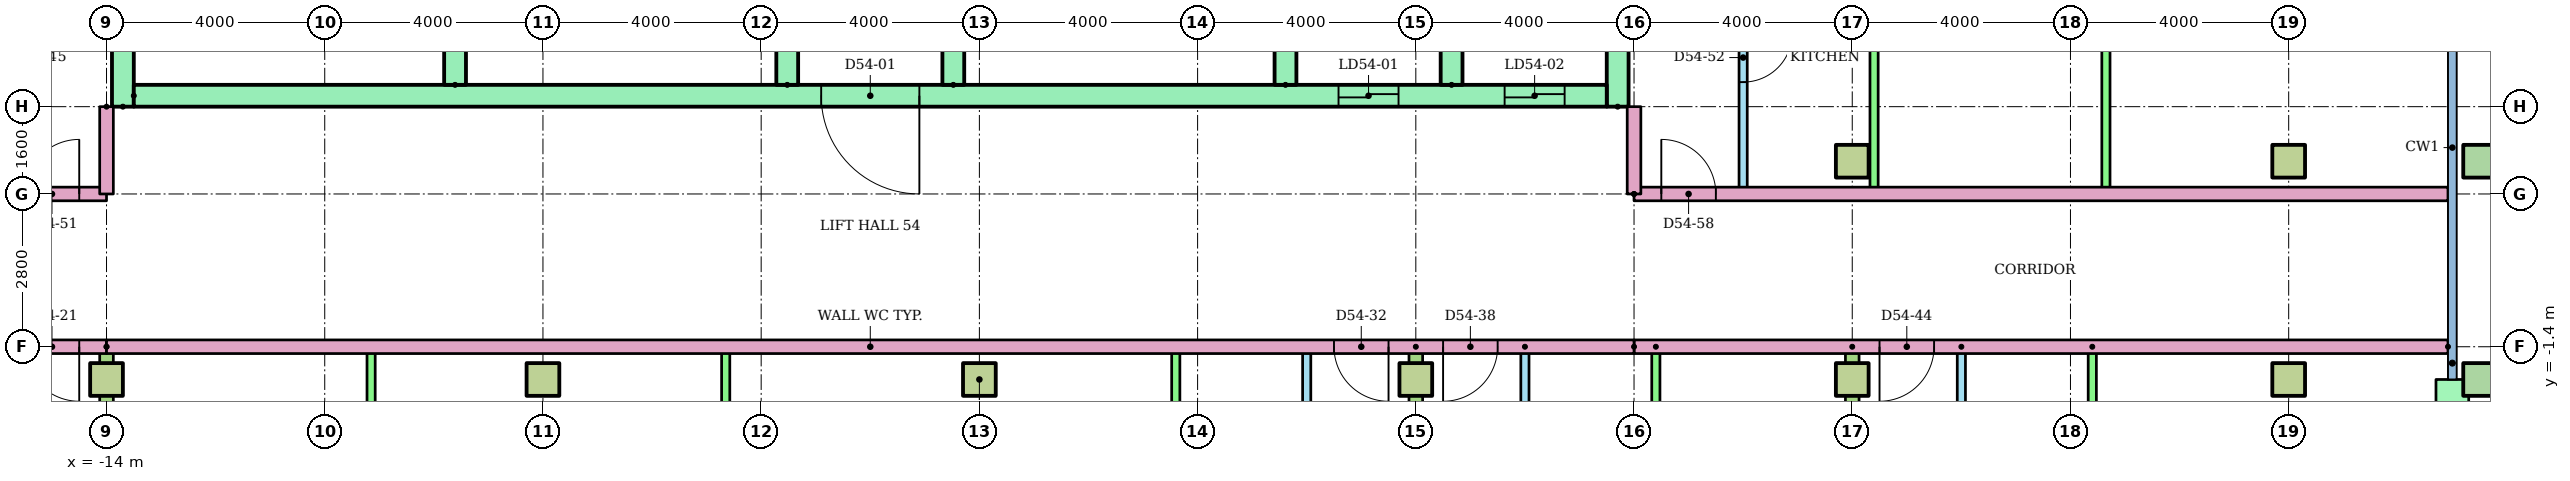
"""IFC4 building model, lengths in metres.
Left out: names, types, materials, properties, quantities, classifications, styles, units other than length and angle.
Written with IfcOpenShell. Run it as: python <this file> out.ifc"""

import sys

from ifc_helpers import new_model, si_unit, direction, frame, frame_2d, origin, origin_2d, place, context, subcontext, project, spatial, rectangle, hollow_rectangle, extrude, element, fill, save


model = new_model("IFC4")
c1 = context("Model", 3, precision=1e-05, world=origin(), true_north=direction((0.0, 1.0)))
c2 = subcontext(c1, "Body", "Model", "MODEL_VIEW")
j1 = project(units=[si_unit("LENGTHUNIT", "METRE"), si_unit("PLANEANGLEUNIT", "RADIAN")], contexts=[c1])
p1 = place(None, origin())
s1 = spatial("IfcSite", under=j1, at=p1, CompositionType="ELEMENT")
p2 = place(p1, origin())
s2 = spatial("IfcBuilding", under=s1, at=p2, CompositionType="ELEMENT")
p3 = place(p2, frame((0.0, 0.0, 210.8)))
s3 = spatial("IfcBuildingStorey", under=s2, at=p3, CompositionType="ELEMENT", Elevation=210.8)
for number, where in (
    (1, (-14.0, -2.0, 0.0)),
    (2, (-6.0, -2.0, 0.0)),
    (3, (2.0, -2.0, 0.0)),
    (4, (10.0, -2.0, 0.0)),
    (5, (18.0, -2.0, 0.0)),
    (6, (26.0, -2.0, 0.0)),
):
    element("IfcColumn", number, at=place(p3, frame(where)), inside=s3, PredefinedType="COLUMN", context=c2, shape_type="SweptSolid", body=[
        extrude(rectangle(XDim=0.6, YDim=0.6, at=origin_2d()), origin(), (0.0, 0.0, 1.0), 3.2),
    ])
p4 = place(p3, frame((29.5, -2.0, 0.0)))
e7 = element("IfcColumn", 7, at=p4, inside=s3, PredefinedType="COLUMN", context=c2, shape_type="SweptSolid", body=[
    extrude(hollow_rectangle(XDim=0.6, YDim=0.6, WallThickness=0.03, at=origin_2d()), origin(), (0.0, 0.0, 1.0), 3.2),
])
for number, where in (
    (8, (18.0, 2.0, 0.0)),
    (9, (26.0, 2.0, 0.0)),
):
    element("IfcColumn", number, at=place(p3, frame(where)), inside=s3, PredefinedType="COLUMN", context=c2, shape_type="SweptSolid", body=[
        extrude(rectangle(XDim=0.6, YDim=0.6, at=origin_2d()), origin(), (0.0, 0.0, 1.0), 3.2),
    ])
p5 = place(p3, frame((29.5, 2.0, 0.0)))
e10 = element("IfcColumn", 10, at=p5, inside=s3, PredefinedType="COLUMN", context=c2, shape_type="SweptSolid", body=[
    extrude(hollow_rectangle(XDim=0.6, YDim=0.6, WallThickness=0.03, at=origin_2d()), origin(), (0.0, 0.0, 1.0), 3.2),
])
p6 = place(p3, frame((29.0, -5.7, 0.0), z_axis=(0.0, 0.0, 1.0), x_axis=(0.0, 1.0, 0.0)))
e11 = element("IfcWall", 11, at=p6, inside=s3, PredefinedType="STANDARD", context=c2, shape_type="SweptSolid", body=[
    extrude(rectangle(XDim=3.7, YDim=0.6, at=frame_2d((1.85, 0.0))), origin(), (0.0, 0.0, 1.0), 2.92),
])
p7 = place(p6, frame((1.25, 0.0, 0.0)))
e12 = element("IfcOpeningElement", 12, at=p7, cuts=e11, PredefinedType="OPENING", context=c2, shape_type="SweptSolid", body=[
    extrude(rectangle(XDim=1.2, YDim=2.1, at=frame_2d((0.6, 1.05))), frame((0.0, 0.31, 0.0), z_axis=(0.0, -1.0, 0.0), x_axis=(1.0, 0.0, 0.0)), (0.0, 0.0, 1.0), 0.62),
])
for number, where, z_axis, x_axis in (
    (13, (-13.7, 3.0, 0.0), (0.0, 0.0, 1.0), (0.0, 1.0, 0.0)),
    (14, (13.7, 3.0, 0.0), (0.0, 0.0, 1.0), (0.0, 1.0, 0.0)),
):
    element("IfcWall", number, at=place(p3, frame(where, z_axis=z_axis, x_axis=x_axis)), inside=s3, PredefinedType="SHEAR", context=c2, shape_type="SweptSolid", body=[
        extrude(rectangle(XDim=17.0, YDim=0.4, at=frame_2d((8.5, 0.0))), origin(), (0.0, 0.0, 1.0), 2.92),
    ])
p8 = place(p3, frame((-13.5, 3.2, 0.0)))
e15 = element("IfcWall", 15, at=p8, inside=s3, PredefinedType="SHEAR", context=c2, shape_type="SweptSolid", body=[
    extrude(rectangle(XDim=27.0, YDim=0.4, at=frame_2d((13.5, 0.0))), origin(), (0.0, 0.0, 1.0), 2.92),
])
p9 = place(p8, frame((22.083, 0.0, 0.0)))
e16 = element("IfcOpeningElement", 16, at=p9, cuts=e15, PredefinedType="OPENING", context=c2, shape_type="SweptSolid", body=[
    extrude(rectangle(XDim=1.1, YDim=2.1, at=frame_2d((0.55, 1.05))), frame((0.0, 0.21, 0.0), z_axis=(0.0, -1.0, 0.0), x_axis=(1.0, 0.0, 0.0)), (0.0, 0.0, 1.0), 0.42),
])
p10 = place(p8, frame((25.128, 0.0, 0.0)))
e17 = element("IfcOpeningElement", 17, at=p10, cuts=e15, PredefinedType="OPENING", context=c2, shape_type="SweptSolid", body=[
    extrude(rectangle(XDim=1.1, YDim=2.1, at=frame_2d((0.55, 1.05))), frame((0.0, 0.21, 0.0), z_axis=(0.0, -1.0, 0.0), x_axis=(1.0, 0.0, 0.0)), (0.0, 0.0, 1.0), 0.42),
])
p11 = place(p8, frame((12.6, 0.0, 0.0)))
e18 = element("IfcOpeningElement", 18, at=p11, cuts=e15, PredefinedType="OPENING", context=c2, shape_type="SweptSolid", body=[
    extrude(rectangle(XDim=1.8, YDim=2.1, at=frame_2d((0.9, 1.05))), frame((0.0, 0.21, 0.0), z_axis=(0.0, -1.0, 0.0), x_axis=(1.0, 0.0, 0.0)), (0.0, 0.0, 1.0), 0.42),
])
for number, where, z_axis, x_axis in (
    (19, (-7.611, 3.4, 0.0), (0.0, 0.0, 1.0), (0.0, 1.0, 0.0)),
    (20, (-1.522, 3.4, 0.0), (0.0, 0.0, 1.0), (0.0, 1.0, 0.0)),
    (21, (1.522, 3.4, 0.0), (0.0, 0.0, 1.0), (0.0, 1.0, 0.0)),
    (22, (7.611, 3.4, 0.0), (0.0, 0.0, 1.0), (0.0, 1.0, 0.0)),
    (23, (10.656, 3.4, 0.0), (0.0, 0.0, 1.0), (0.0, 1.0, 0.0)),
):
    element("IfcWall", number, at=place(p3, frame(where, z_axis=z_axis, x_axis=x_axis)), inside=s3, PredefinedType="SHEAR", context=c2, shape_type="SweptSolid", body=[
        extrude(rectangle(XDim=3.0, YDim=0.4, at=frame_2d((1.5, 0.0))), origin(), (0.0, 0.0, 1.0), 2.92),
    ])
p12 = place(p3, frame((8.0, -8.2, 0.0), z_axis=(0.0, 0.0, 1.0), x_axis=(0.0, 1.0, 0.0)))
e24 = element("IfcWall", 24, at=p12, inside=s3, PredefinedType="PARTITIONING", context=c2, shape_type="SweptSolid", body=[
    extrude(rectangle(XDim=6.8, YDim=0.15, at=frame_2d((3.4, 0.0))), origin(), (0.0, 0.0, 1.0), 2.4),
])
p13 = place(p12, frame((4.475, 0.0, 0.0)))
e25 = element("IfcOpeningElement", 25, at=p13, cuts=e24, PredefinedType="OPENING", context=c2, shape_type="SweptSolid", body=[
    extrude(rectangle(XDim=0.9, YDim=2.1, at=frame_2d((0.45, 1.05))), frame((0.0, 0.085, 0.0), z_axis=(0.0, -1.0, 0.0), x_axis=(1.0, 0.0, 0.0)), (0.0, 0.0, 1.0), 0.17),
])
p14 = place(p12, frame((1.125, 0.0, 0.0)))
e26 = element("IfcOpeningElement", 26, at=p14, cuts=e24, PredefinedType="OPENING", context=c2, shape_type="SweptSolid", body=[
    extrude(rectangle(XDim=0.8, YDim=2.1, at=frame_2d((0.4, 1.05))), frame((0.0, 0.085, 0.0), z_axis=(0.0, -1.0, 0.0), x_axis=(1.0, 0.0, 0.0)), (0.0, 0.0, 1.0), 0.17),
])
for number, where, z_axis, x_axis in (
    (27, (5.6, -8.2, 0.0), (0.0, 0.0, 1.0), (0.0, 1.0, 0.0)),
    (28, (-2.65, -8.2, 0.0), (0.0, 0.0, 1.0), (0.0, 1.0, 0.0)),
    (29, (-9.15, -8.2, 0.0), (0.0, 0.0, 1.0), (0.0, 1.0, 0.0)),
):
    element("IfcWall", number, at=place(p3, frame(where, z_axis=z_axis, x_axis=x_axis)), inside=s3, PredefinedType="PARTITIONING", context=c2, shape_type="SweptSolid", body=[
        extrude(rectangle(XDim=6.8, YDim=0.15, at=frame_2d((3.4, 0.0))), origin(), (0.0, 0.0, 1.0), 2.4),
    ])
p15 = place(p3, frame((-14.0, -1.4, 0.0), z_axis=(0.0, 0.0, 1.0), x_axis=(0.0, -1.0, 0.0)))
e30 = element("IfcWall", 30, at=p15, inside=s3, PredefinedType="PARTITIONING", context=c2, shape_type="SweptSolid", body=[
    extrude(rectangle(XDim=15.11, YDim=0.25, at=frame_2d((7.555, 0.0))), origin(), (0.0, 0.0, 1.0), 2.4),
])
p16 = place(p3, frame((12.0, -1.4, 0.0), z_axis=(0.0, 0.0, 1.0), x_axis=(0.0, -1.0, 0.0)))
e31 = element("IfcWall", 31, at=p16, inside=s3, PredefinedType="PARTITIONING", context=c2, shape_type="SweptSolid", body=[
    extrude(rectangle(XDim=6.8, YDim=0.15, at=frame_2d((3.4, 0.0))), origin(), (0.0, 0.0, 1.0), 2.4),
])
p17 = place(p16, frame((1.425, 0.0, 0.0)))
e32 = element("IfcOpeningElement", 32, at=p17, cuts=e31, PredefinedType="OPENING", context=c2, shape_type="SweptSolid", body=[
    extrude(rectangle(XDim=0.9, YDim=2.1, at=frame_2d((0.45, 1.05))), frame((0.0, 0.085, 0.0), z_axis=(0.0, -1.0, 0.0), x_axis=(1.0, 0.0, 0.0)), (0.0, 0.0, 1.0), 0.17),
])
p18 = place(p16, frame((4.875, 0.0, 0.0)))
e33 = element("IfcOpeningElement", 33, at=p18, cuts=e31, PredefinedType="OPENING", context=c2, shape_type="SweptSolid", body=[
    extrude(rectangle(XDim=0.8, YDim=2.1, at=frame_2d((0.4, 1.05))), frame((0.0, 0.085, 0.0), z_axis=(0.0, -1.0, 0.0), x_axis=(1.0, 0.0, 0.0)), (0.0, 0.0, 1.0), 0.17),
])
p19 = place(p3, frame((14.4, -1.4, 0.0), z_axis=(0.0, 0.0, 1.0), x_axis=(0.0, -1.0, 0.0)))
e34 = element("IfcWall", 34, at=p19, inside=s3, PredefinedType="PARTITIONING", context=c2, shape_type="SweptSolid", body=[
    extrude(rectangle(XDim=6.8, YDim=0.15, at=frame_2d((3.4, 0.0))), origin(), (0.0, 0.0, 1.0), 2.4),
])
p20 = place(p3, frame((10.0, -1.4, 0.0), z_axis=(0.0, 0.0, 1.0), x_axis=(0.0, -1.0, 0.0)))
e35 = element("IfcWall", 35, at=p20, inside=s3, PredefinedType="PARTITIONING", context=c2, shape_type="SweptSolid", body=[
    extrude(rectangle(XDim=15.11, YDim=0.25, at=frame_2d((7.555, 0.0))), origin(), (0.0, 0.0, 1.0), 2.4),
])
p21 = place(p3, frame((20.0, -1.4, 0.0), z_axis=(0.0, 0.0, 1.0), x_axis=(0.0, -1.0, 0.0)))
e36 = element("IfcWall", 36, at=p21, inside=s3, PredefinedType="PARTITIONING", context=c2, shape_type="SweptSolid", body=[
    extrude(rectangle(XDim=6.8, YDim=0.15, at=frame_2d((3.4, 0.0))), origin(), (0.0, 0.0, 1.0), 2.4),
])
p22 = place(p21, frame((1.425, 0.0, 0.0)))
e37 = element("IfcOpeningElement", 37, at=p22, cuts=e36, PredefinedType="OPENING", context=c2, shape_type="SweptSolid", body=[
    extrude(rectangle(XDim=0.9, YDim=2.1, at=frame_2d((0.45, 1.05))), frame((0.0, 0.085, 0.0), z_axis=(0.0, -1.0, 0.0), x_axis=(1.0, 0.0, 0.0)), (0.0, 0.0, 1.0), 0.17),
])
p23 = place(p21, frame((4.875, 0.0, 0.0)))
e38 = element("IfcOpeningElement", 38, at=p23, cuts=e36, PredefinedType="OPENING", context=c2, shape_type="SweptSolid", body=[
    extrude(rectangle(XDim=0.8, YDim=2.1, at=frame_2d((0.4, 1.05))), frame((0.0, 0.085, 0.0), z_axis=(0.0, -1.0, 0.0), x_axis=(1.0, 0.0, 0.0)), (0.0, 0.0, 1.0), 0.17),
])
p24 = place(p3, frame((22.4, -1.4, 0.0), z_axis=(0.0, 0.0, 1.0), x_axis=(0.0, -1.0, 0.0)))
e39 = element("IfcWall", 39, at=p24, inside=s3, PredefinedType="PARTITIONING", context=c2, shape_type="SweptSolid", body=[
    extrude(rectangle(XDim=6.8, YDim=0.15, at=frame_2d((3.4, 0.0))), origin(), (0.0, 0.0, 1.0), 2.4),
])
p25 = place(p3, frame((18.0, -1.4, 0.0), z_axis=(0.0, 0.0, 1.0), x_axis=(0.0, -1.0, 0.0)))
e40 = element("IfcWall", 40, at=p25, inside=s3, PredefinedType="PARTITIONING", context=c2, shape_type="SweptSolid", body=[
    extrude(rectangle(XDim=15.11, YDim=0.25, at=frame_2d((7.555, 0.0))), origin(), (0.0, 0.0, 1.0), 2.4),
])
p26 = place(p3, frame((-14.0, -1.4, 0.0), z_axis=(0.0, 0.0, 1.0), x_axis=(-1.0, 0.0, 0.0)))
e41 = element("IfcWall", 41, at=p26, inside=s3, PredefinedType="PARTITIONING", context=c2, shape_type="SweptSolid", body=[
    extrude(rectangle(XDim=14.92, YDim=0.25, at=frame_2d((7.46, 0.0))), origin(), (0.0, 0.0, 1.0), 2.4),
])
p27 = place(p26, frame((0.5, 0.0, 0.0)))
e42 = element("IfcOpeningElement", 42, at=p27, cuts=e41, PredefinedType="OPENING", context=c2, shape_type="SweptSolid", body=[
    extrude(rectangle(XDim=1.0, YDim=2.1, at=frame_2d((0.5, 1.05))), frame((0.0, 0.135, 0.0), z_axis=(0.0, -1.0, 0.0), x_axis=(1.0, 0.0, 0.0)), (0.0, 0.0, 1.0), 0.27),
])
p28 = place(p3, frame((28.92, -1.4, 0.0), z_axis=(0.0, 0.0, 1.0), x_axis=(-1.0, 0.0, 0.0)))
e43 = element("IfcWall", 43, at=p28, inside=s3, PredefinedType="PARTITIONING", context=c2, shape_type="SweptSolid", body=[
    extrude(rectangle(XDim=14.92, YDim=0.25, at=frame_2d((7.46, 0.0))), origin(), (0.0, 0.0, 1.0), 2.4),
])
p29 = place(p28, frame((9.42, 0.0, 0.0)))
e44 = element("IfcOpeningElement", 44, at=p29, cuts=e43, PredefinedType="OPENING", context=c2, shape_type="SweptSolid", body=[
    extrude(rectangle(XDim=1.0, YDim=2.1, at=frame_2d((0.5, 1.05))), frame((0.0, 0.135, 0.0), z_axis=(0.0, -1.0, 0.0), x_axis=(1.0, 0.0, 0.0)), (0.0, 0.0, 1.0), 0.27),
])
p30 = place(p3, frame((-28.92, 1.4, 0.0)))
e45 = element("IfcWall", 45, at=p30, inside=s3, PredefinedType="PARTITIONING", context=c2, shape_type="SweptSolid", body=[
    extrude(rectangle(XDim=14.92, YDim=0.25, at=frame_2d((7.46, 0.0))), origin(), (0.0, 0.0, 1.0), 2.4),
])
p31 = place(p30, frame((13.42, 0.0, 0.0)))
e46 = element("IfcOpeningElement", 46, at=p31, cuts=e45, PredefinedType="OPENING", context=c2, shape_type="SweptSolid", body=[
    extrude(rectangle(XDim=1.0, YDim=2.1, at=frame_2d((0.5, 1.05))), frame((0.0, 0.135, 0.0), z_axis=(0.0, -1.0, 0.0), x_axis=(1.0, 0.0, 0.0)), (0.0, 0.0, 1.0), 0.27),
])
p32 = place(p3, frame((16.0, 10.6, 0.0), z_axis=(0.0, 0.0, 1.0), x_axis=(0.0, -1.0, 0.0)))
e47 = element("IfcWall", 47, at=p32, inside=s3, PredefinedType="PARTITIONING", context=c2, shape_type="SweptSolid", body=[
    extrude(rectangle(XDim=9.2, YDim=0.15, at=frame_2d((4.6, 0.0))), origin(), (0.0, 0.0, 1.0), 2.4),
])
p33 = place(p32, frame((6.25, 0.0, 0.0)))
e48 = element("IfcOpeningElement", 48, at=p33, cuts=e47, PredefinedType="OPENING", context=c2, shape_type="SweptSolid", body=[
    extrude(rectangle(XDim=0.9, YDim=2.1, at=frame_2d((0.45, 1.05))), frame((0.0, 0.085, 0.0), z_axis=(0.0, -1.0, 0.0), x_axis=(1.0, 0.0, 0.0)), (0.0, 0.0, 1.0), 0.17),
])
p34 = place(p32, frame((1.7, 0.0, 0.0)))
e49 = element("IfcOpeningElement", 49, at=p34, cuts=e47, PredefinedType="OPENING", context=c2, shape_type="SweptSolid", body=[
    extrude(rectangle(XDim=0.8, YDim=2.1, at=frame_2d((0.4, 1.05))), frame((0.0, 0.085, 0.0), z_axis=(0.0, -1.0, 0.0), x_axis=(1.0, 0.0, 0.0)), (0.0, 0.0, 1.0), 0.17),
])
for number, where, z_axis, x_axis in (
    (50, (18.4, 10.6, 0.0), (0.0, 0.0, 1.0), (0.0, -1.0, 0.0)),
    (51, (22.65, 10.6, 0.0), (0.0, 0.0, 1.0), (0.0, -1.0, 0.0)),
):
    element("IfcWall", number, at=place(p3, frame(where, z_axis=z_axis, x_axis=x_axis)), inside=s3, PredefinedType="PARTITIONING", context=c2, shape_type="SweptSolid", body=[
        extrude(rectangle(XDim=9.2, YDim=0.15, at=frame_2d((4.6, 0.0))), origin(), (0.0, 0.0, 1.0), 2.4),
    ])
p35 = place(p3, frame((14.0, 1.4, 0.0)))
e52 = element("IfcWall", 52, at=p35, inside=s3, PredefinedType="PARTITIONING", context=c2, shape_type="SweptSolid", body=[
    extrude(rectangle(XDim=14.92, YDim=0.25, at=frame_2d((7.46, 0.0))), origin(), (0.0, 0.0, 1.0), 2.4),
])
p36 = place(p35, frame((0.5, 0.0, 0.0)))
e53 = element("IfcOpeningElement", 53, at=p36, cuts=e52, PredefinedType="OPENING", context=c2, shape_type="SweptSolid", body=[
    extrude(rectangle(XDim=1.0, YDim=2.1, at=frame_2d((0.5, 1.05))), frame((0.0, 0.135, 0.0), z_axis=(0.0, -1.0, 0.0), x_axis=(1.0, 0.0, 0.0)), (0.0, 0.0, 1.0), 0.27),
])
p37 = place(p3, frame((14.0, -1.4, 0.0), z_axis=(0.0, 0.0, 1.0), x_axis=(-1.0, 0.0, 0.0)))
e54 = element("IfcWall", 54, at=p37, inside=s3, PredefinedType="PARTITIONING", context=c2, shape_type="SweptSolid", body=[
    extrude(rectangle(XDim=28.0, YDim=0.25, at=frame_2d((14.0, 0.0))), origin(), (0.0, 0.0, 1.0), 2.4),
])
p38 = place(p37, frame((4.5, 0.0, 0.0)))
e55 = element("IfcOpeningElement", 55, at=p38, cuts=e54, PredefinedType="OPENING", context=c2, shape_type="SweptSolid", body=[
    extrude(rectangle(XDim=1.0, YDim=2.1, at=frame_2d((0.5, 1.05))), frame((0.0, 0.135, 0.0), z_axis=(0.0, -1.0, 0.0), x_axis=(1.0, 0.0, 0.0)), (0.0, 0.0, 1.0), 0.27),
])
p39 = place(p37, frame((2.5, 0.0, 0.0)))
e56 = element("IfcOpeningElement", 56, at=p39, cuts=e54, PredefinedType="OPENING", context=c2, shape_type="SweptSolid", body=[
    extrude(rectangle(XDim=1.0, YDim=2.1, at=frame_2d((0.5, 1.05))), frame((0.0, 0.135, 0.0), z_axis=(0.0, -1.0, 0.0), x_axis=(1.0, 0.0, 0.0)), (0.0, 0.0, 1.0), 0.27),
])
for number, where, z_axis, x_axis in (
    (57, (-14.0, 3.0, 0.0), (0.0, 0.0, 1.0), (0.0, -1.0, 0.0)),
    (58, (14.0, 1.4, 0.0), (0.0, 0.0, 1.0), (0.0, 1.0, 0.0)),
):
    element("IfcWall", number, at=place(p3, frame(where, z_axis=z_axis, x_axis=x_axis)), inside=s3, PredefinedType="PARTITIONING", context=c2, shape_type="SweptSolid", body=[
        extrude(rectangle(XDim=1.6, YDim=0.25, at=frame_2d((0.8, 0.0))), origin(), (0.0, 0.0, 1.0), 2.4),
    ])
p40 = place(p9, origin())
e59 = element("IfcDoor", 59, at=p40, inside=s3, OperationType="SLIDING_TO_LEFT", PredefinedType="DOOR", context=c2, shape_type="SweptSolid", body=[
    extrude(rectangle(XDim=1.1, YDim=2.1, at=frame_2d((0.55, 1.05))), frame((0.0, 0.025, 0.0), z_axis=(0.0, -1.0, 0.0), x_axis=(1.0, 0.0, 0.0)), (0.0, 0.0, 1.0), 0.05),
])
fill(e16, e59)
p41 = place(p10, origin())
e60 = element("IfcDoor", 60, at=p41, inside=s3, OperationType="SLIDING_TO_LEFT", PredefinedType="DOOR", context=c2, shape_type="SweptSolid", body=[
    extrude(rectangle(XDim=1.1, YDim=2.1, at=frame_2d((0.55, 1.05))), frame((0.0, 0.025, 0.0), z_axis=(0.0, -1.0, 0.0), x_axis=(1.0, 0.0, 0.0)), (0.0, 0.0, 1.0), 0.05),
])
fill(e17, e60)
p42 = place(p11, frame((1.8, 0.0, 0.0), z_axis=(0.0, 0.0, 1.0), x_axis=(-1.0, 0.0, 0.0)))
e61 = element("IfcDoor", 61, at=p42, inside=s3, OperationType="DOUBLE_DOOR_SINGLE_SWING", PredefinedType="DOOR", context=c2, shape_type="SweptSolid", body=[
    extrude(rectangle(XDim=1.8, YDim=2.1, at=frame_2d((0.9, 1.05))), frame((0.0, 0.025, 0.0), z_axis=(0.0, -1.0, 0.0), x_axis=(1.0, 0.0, 0.0)), (0.0, 0.0, 1.0), 0.05),
])
fill(e18, e61)
p43 = place(p27, origin())
e62 = element("IfcDoor", 62, at=p43, inside=s3, OperationType="SINGLE_SWING_LEFT", PredefinedType="DOOR", context=c2, shape_type="SweptSolid", body=[
    extrude(rectangle(XDim=1.0, YDim=2.1, at=frame_2d((0.5, 1.05))), frame((0.0, 0.025, 0.0), z_axis=(0.0, -1.0, 0.0), x_axis=(1.0, 0.0, 0.0)), (0.0, 0.0, 1.0), 0.05),
])
fill(e42, e62)
p44 = place(p38, origin())
e63 = element("IfcDoor", 63, at=p44, inside=s3, OperationType="SINGLE_SWING_LEFT", PredefinedType="DOOR", context=c2, shape_type="SweptSolid", body=[
    extrude(rectangle(XDim=1.0, YDim=2.1, at=frame_2d((0.5, 1.05))), frame((0.0, 0.025, 0.0), z_axis=(0.0, -1.0, 0.0), x_axis=(1.0, 0.0, 0.0)), (0.0, 0.0, 1.0), 0.05),
])
fill(e55, e63)
p45 = place(p39, origin())
e64 = element("IfcDoor", 64, at=p45, inside=s3, OperationType="SINGLE_SWING_RIGHT", PredefinedType="DOOR", context=c2, shape_type="SweptSolid", body=[
    extrude(rectangle(XDim=1.0, YDim=2.1, at=frame_2d((0.5, 1.05))), frame((0.0, 0.025, 0.0), z_axis=(0.0, -1.0, 0.0), x_axis=(1.0, 0.0, 0.0)), (0.0, 0.0, 1.0), 0.05),
])
fill(e56, e64)
p46 = place(p29, origin())
e65 = element("IfcDoor", 65, at=p46, inside=s3, OperationType="SINGLE_SWING_RIGHT", PredefinedType="DOOR", context=c2, shape_type="SweptSolid", body=[
    extrude(rectangle(XDim=1.0, YDim=2.1, at=frame_2d((0.5, 1.05))), frame((0.0, 0.025, 0.0), z_axis=(0.0, -1.0, 0.0), x_axis=(1.0, 0.0, 0.0)), (0.0, 0.0, 1.0), 0.05),
])
fill(e44, e65)
p47 = place(p31, origin())
e66 = element("IfcDoor", 66, at=p47, inside=s3, OperationType="SINGLE_SWING_RIGHT", PredefinedType="DOOR", context=c2, shape_type="SweptSolid", body=[
    extrude(rectangle(XDim=1.0, YDim=2.1, at=frame_2d((0.5, 1.05))), frame((0.0, 0.025, 0.0), z_axis=(0.0, -1.0, 0.0), x_axis=(1.0, 0.0, 0.0)), (0.0, 0.0, 1.0), 0.05),
])
fill(e46, e66)
p48 = place(p33, origin())
e67 = element("IfcDoor", 67, at=p48, inside=s3, OperationType="SINGLE_SWING_LEFT", PredefinedType="DOOR", context=c2, shape_type="SweptSolid", body=[
    extrude(rectangle(XDim=0.9, YDim=2.1, at=frame_2d((0.45, 1.05))), frame((0.0, 0.025, 0.0), z_axis=(0.0, -1.0, 0.0), x_axis=(1.0, 0.0, 0.0)), (0.0, 0.0, 1.0), 0.05),
])
fill(e48, e67)
p49 = place(p36, origin())
e68 = element("IfcDoor", 68, at=p49, inside=s3, OperationType="SINGLE_SWING_LEFT", PredefinedType="DOOR", context=c2, shape_type="SweptSolid", body=[
    extrude(rectangle(XDim=1.0, YDim=2.1, at=frame_2d((0.5, 1.05))), frame((0.0, 0.025, 0.0), z_axis=(0.0, -1.0, 0.0), x_axis=(1.0, 0.0, 0.0)), (0.0, 0.0, 1.0), 0.05),
])
fill(e53, e68)
save(model, sys.argv[1])
